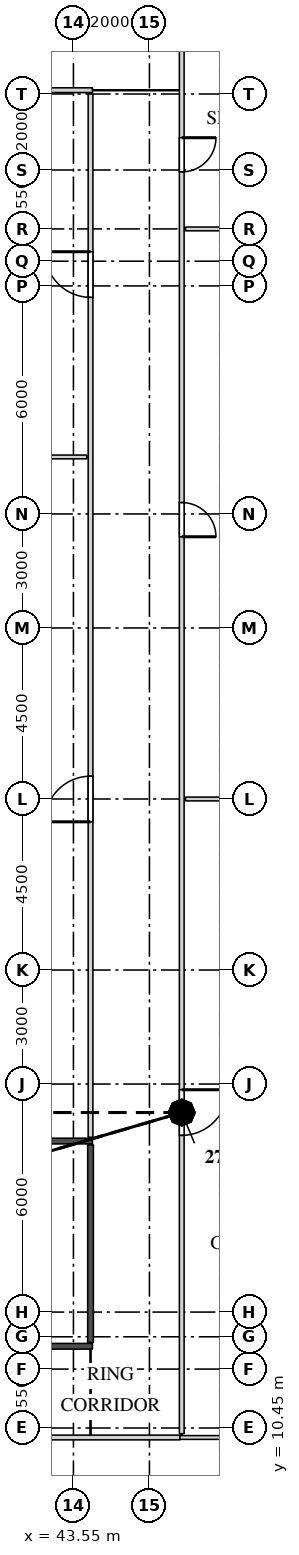
"""IFC4 building model, lengths in metres.
Left out: names, types, materials, properties, quantities, classifications, styles, units other than length and angle.
Written with IfcOpenShell. Run it as: python <this file> out.ifc"""

import sys

from ifc_helpers import new_model, si_unit, direction, frame, frame_2d, origin, place, context, subcontext, project, spatial, rectangle, extrude, source, transform, mapped, element, fill, save


model = new_model("IFC4")
c1 = context("Model", 3, precision=1e-05, world=origin(), true_north=direction((0.0, 1.0)))
c2 = subcontext(c1, "Body", "Model", "MODEL_VIEW")
j1 = project(units=[si_unit("LENGTHUNIT", "METRE"), si_unit("PLANEANGLEUNIT", "RADIAN")], contexts=[c1])
p1 = place(None, origin())
s1 = spatial("IfcSite", under=j1, at=p1, CompositionType="ELEMENT")
p2 = place(p1, origin())
s2 = spatial("IfcBuilding", under=s1, at=p2, CompositionType="ELEMENT")
p3 = place(p2, frame((0.0, 0.0, 127.9)))
s3 = spatial("IfcBuildingStorey", under=s2, at=p3, CompositionType="ELEMENT", Elevation=127.9)
m1 = source(origin(), c2, "Body", "SweptSolid", [
    extrude(rectangle(XDim=20.0, YDim=0.125, at=frame_2d((10.0, 0.0))), origin(), (0.0, 0.0, 1.0), 4.2),
])
p4 = place(p3, frame((26.35, 10.2, 0.0), z_axis=(0.0, 0.0, 1.0), x_axis=(1.0, 0.0, 0.0)))
e1 = element("IfcWall", 1, at=p4, inside=s3, PredefinedType="PARTITIONING", context=c2, shape_type="MappedRepresentation", body=[
    mapped(m1, transform((0.0, 0.0, 0.0))),
])
m2 = source(origin(), c2, "Body", "SweptSolid", [
    extrude(rectangle(XDim=1.2, YDim=2.1, at=frame_2d((0.6, 1.05))), frame((0.0, 0.073, 0.0), z_axis=(0.0, -1.0, 0.0), x_axis=(1.0, 0.0, 0.0)), (0.0, 0.0, 1.0), 0.145),
])
p5 = place(p4, frame((3.5, 0.0, 0.0)))
e2 = element("IfcOpeningElement", 2, at=p5, cuts=e1, PredefinedType="OPENING", context=c2, shape_type="MappedRepresentation", body=[
    mapped(m2, transform((0.0, 0.0, 0.0))),
])
p6 = place(p4, frame((12.3, 0.0, 0.0)))
e3 = element("IfcOpeningElement", 3, at=p6, cuts=e1, PredefinedType="OPENING", context=c2, shape_type="MappedRepresentation", body=[
    mapped(m2, transform((0.0, 0.0, 0.0))),
])
m3 = source(origin(), c2, "Body", "SweptSolid", [
    extrude(rectangle(XDim=6.0, YDim=0.1, at=frame_2d((3.0, 0.0))), origin(), (0.0, 0.0, 1.0), 4.2),
])
p7 = place(p3, frame((46.35, 10.2, 0.0), z_axis=(0.0, 0.0, 1.0), x_axis=(1.0, 0.0, 0.0)))
e4 = element("IfcWall", 4, at=p7, inside=s3, PredefinedType="PARTITIONING", context=c2, shape_type="MappedRepresentation", body=[
    mapped(m3, transform((0.0, 0.0, 0.0))),
])
m4 = source(origin(), c2, "Body", "SweptSolid", [
    extrude(rectangle(XDim=37.65, YDim=0.125, at=frame_2d((18.825, 0.0))), origin(), (0.0, 0.0, 1.0), 4.2),
])
p8 = place(p3, frame((46.4, 10.3, 0.0), z_axis=(0.0, 0.0, 1.0), x_axis=(0.0, 1.0, 0.0)))
e5 = element("IfcWall", 5, at=p8, inside=s3, PredefinedType="PARTITIONING", context=c2, shape_type="MappedRepresentation", body=[
    mapped(m4, transform((0.0, 0.0, 0.0))),
])
p9 = place(p8, frame((7.85, 0.0, 0.0)))
e6 = element("IfcOpeningElement", 6, at=p9, cuts=e5, PredefinedType="OPENING", context=c2, shape_type="MappedRepresentation", body=[
    mapped(m2, transform((0.0, 0.0, 0.0))),
])
m5 = source(origin(), c2, "Body", "SweptSolid", [
    extrude(rectangle(XDim=0.9, YDim=2.1, at=frame_2d((0.45, 1.05))), frame((0.0, 0.073, 0.0), z_axis=(0.0, -1.0, 0.0), x_axis=(1.0, 0.0, 0.0)), (0.0, 0.0, 1.0), 0.145),
])
p10 = place(p8, frame((23.6, 0.0, 0.0)))
e7 = element("IfcOpeningElement", 7, at=p10, cuts=e5, PredefinedType="OPENING", context=c2, shape_type="MappedRepresentation", body=[
    mapped(m5, transform((0.0, 0.0, 0.0))),
])
p11 = place(p8, frame((33.2, 0.0, 0.0)))
e8 = element("IfcOpeningElement", 8, at=p11, cuts=e5, PredefinedType="OPENING", context=c2, shape_type="MappedRepresentation", body=[
    mapped(m5, transform((0.0, 0.0, 0.0))),
])
m6 = source(origin(), c2, "Body", "SweptSolid", [
    extrude(rectangle(XDim=17.7, YDim=0.15, at=frame_2d((8.85, 0.0))), origin(), (0.0, 0.0, 1.0), 4.2),
])
p12 = place(p3, frame((26.35, 12.6, 0.0), z_axis=(0.0, 0.0, 1.0), x_axis=(1.0, 0.0, 0.0)))
e9 = element("IfcWall", 9, at=p12, inside=s3, PredefinedType="PARTITIONING", context=c2, shape_type="MappedRepresentation", body=[
    mapped(m6, transform((0.0, 0.0, 0.0))),
])
m7 = source(origin(), c2, "Body", "SweptSolid", [
    extrude(rectangle(XDim=5.2, YDim=0.15, at=frame_2d((2.6, 0.0))), origin(), (0.0, 0.0, 1.0), 4.2),
])
p13 = place(p3, frame((44.0, 12.7, 0.0), z_axis=(0.0, 0.0, 1.0), x_axis=(0.0, 1.0, 0.0)))
e10 = element("IfcWall", 10, at=p13, inside=s3, PredefinedType="PARTITIONING", context=c2, shape_type="MappedRepresentation", body=[
    mapped(m7, transform((0.0, 0.0, 0.0))),
])
p14 = place(p3, frame((26.35, 18.0, 0.0), z_axis=(0.0, 0.0, 1.0), x_axis=(1.0, 0.0, 0.0)))
e11 = element("IfcWall", 11, at=p14, inside=s3, PredefinedType="PARTITIONING", context=c2, shape_type="MappedRepresentation", body=[
    mapped(m6, transform((0.0, 0.0, 0.0))),
])
m8 = source(origin(), c2, "Body", "SweptSolid", [
    extrude(rectangle(XDim=27.45, YDim=0.125, at=frame_2d((13.725, 0.0))), origin(), (0.0, 0.0, 1.0), 4.2),
])
p15 = place(p3, frame((44.0, 18.1, 0.0), z_axis=(0.0, 0.0, 1.0), x_axis=(0.0, 1.0, 0.0)))
e12 = element("IfcWall", 12, at=p15, inside=s3, PredefinedType="PARTITIONING", context=c2, shape_type="MappedRepresentation", body=[
    mapped(m8, transform((0.0, 0.0, 0.0))),
])
p16 = place(p15, frame((8.3, 0.0, 0.0)))
e13 = element("IfcOpeningElement", 13, at=p16, cuts=e12, PredefinedType="OPENING", context=c2, shape_type="MappedRepresentation", body=[
    mapped(m2, transform((0.0, 0.0, 0.0))),
])
p17 = place(p15, frame((22.1, 0.0, 0.0)))
e14 = element("IfcOpeningElement", 14, at=p17, cuts=e12, PredefinedType="OPENING", context=c2, shape_type="MappedRepresentation", body=[
    mapped(m2, transform((0.0, 0.0, 0.0))),
])
m9 = source(origin(), c2, "Body", "SweptSolid", [
    extrude(rectangle(XDim=5.85, YDim=0.1, at=frame_2d((2.925, 0.0))), origin(), (0.0, 0.0, 1.0), 4.2),
])
p18 = place(p3, frame((46.5, 27.0, 0.0), z_axis=(0.0, 0.0, 1.0), x_axis=(1.0, 0.0, 0.0)))
e15 = element("IfcWall", 15, at=p18, inside=s3, PredefinedType="PARTITIONING", context=c2, shape_type="MappedRepresentation", body=[
    mapped(m9, transform((0.0, 0.0, 0.0))),
])
m10 = source(origin(), c2, "Body", "SweptSolid", [
    extrude(rectangle(XDim=13.35, YDim=0.1, at=frame_2d((6.675, 0.0))), origin(), (0.0, 0.0, 1.0), 4.2),
])
p19 = place(p3, frame((30.55, 36.0, 0.0), z_axis=(0.0, 0.0, 1.0), x_axis=(1.0, 0.0, 0.0)))
e16 = element("IfcWall", 16, at=p19, inside=s3, PredefinedType="PARTITIONING", context=c2, shape_type="MappedRepresentation", body=[
    mapped(m10, transform((0.0, 0.0, 0.0))),
])
p20 = place(p3, frame((46.5, 42.0, 0.0), z_axis=(0.0, 0.0, 1.0), x_axis=(1.0, 0.0, 0.0)))
e17 = element("IfcWall", 17, at=p20, inside=s3, PredefinedType="PARTITIONING", context=c2, shape_type="MappedRepresentation", body=[
    mapped(m9, transform((0.0, 0.0, 0.0))),
])
m11 = source(origin(), c2, "Body", "SweptSolid", [
    extrude(rectangle(XDim=13.5, YDim=0.125, at=frame_2d((6.75, 0.0))), origin(), (0.0, 0.0, 1.0), 4.2),
])
p21 = place(p3, frame((30.55, 45.65, 0.0), z_axis=(0.0, 0.0, 1.0), x_axis=(1.0, 0.0, 0.0)))
e18 = element("IfcWall", 18, at=p21, inside=s3, PredefinedType="PARTITIONING", context=c2, shape_type="MappedRepresentation", body=[
    mapped(m11, transform((0.0, 0.0, 0.0))),
])
m12 = source(origin(), c2, "Body", "SweptSolid", [
    extrude(rectangle(XDim=1.2, YDim=2.1, at=frame_2d((0.6, 1.05))), frame((0.0, 0.025, 0.0), z_axis=(0.0, -1.0, 0.0), x_axis=(1.0, 0.0, 0.0)), (0.0, 0.0, 1.0), 0.05),
])
p22 = place(p16, origin())
e19 = element("IfcDoor", 19, at=p22, inside=s3, OperationType="SINGLE_SWING_RIGHT", PredefinedType="DOOR", context=c2, shape_type="MappedRepresentation", body=[
    mapped(m12, transform((0.0, 0.0, 0.0))),
])
fill(e13, e19)
p23 = place(p17, origin())
e20 = element("IfcDoor", 20, at=p23, inside=s3, OperationType="SINGLE_SWING_LEFT", PredefinedType="DOOR", context=c2, shape_type="MappedRepresentation", body=[
    mapped(m12, transform((0.0, 0.0, 0.0))),
])
fill(e14, e20)
p24 = place(p9, origin())
e21 = element("IfcDoor", 21, at=p24, inside=s3, OperationType="SINGLE_SWING_RIGHT", PredefinedType="DOOR", context=c2, shape_type="MappedRepresentation", body=[
    mapped(m12, transform((0.0, 0.0, 0.0))),
])
fill(e6, e21)
m13 = source(origin(), c2, "Body", "SweptSolid", [
    extrude(rectangle(XDim=0.9, YDim=2.1, at=frame_2d((0.45, 1.05))), frame((0.0, 0.025, 0.0), z_axis=(0.0, -1.0, 0.0), x_axis=(1.0, 0.0, 0.0)), (0.0, 0.0, 1.0), 0.05),
])
p25 = place(p10, origin())
e22 = element("IfcDoor", 22, at=p25, inside=s3, OperationType="SINGLE_SWING_LEFT", PredefinedType="DOOR", context=c2, shape_type="MappedRepresentation", body=[
    mapped(m13, transform((0.0, 0.0, 0.0))),
])
fill(e7, e22)
p26 = place(p11, origin())
e23 = element("IfcDoor", 23, at=p26, inside=s3, OperationType="SINGLE_SWING_RIGHT", PredefinedType="DOOR", context=c2, shape_type="MappedRepresentation", body=[
    mapped(m13, transform((0.0, 0.0, 0.0))),
])
fill(e8, e23)
save(model, sys.argv[1])
